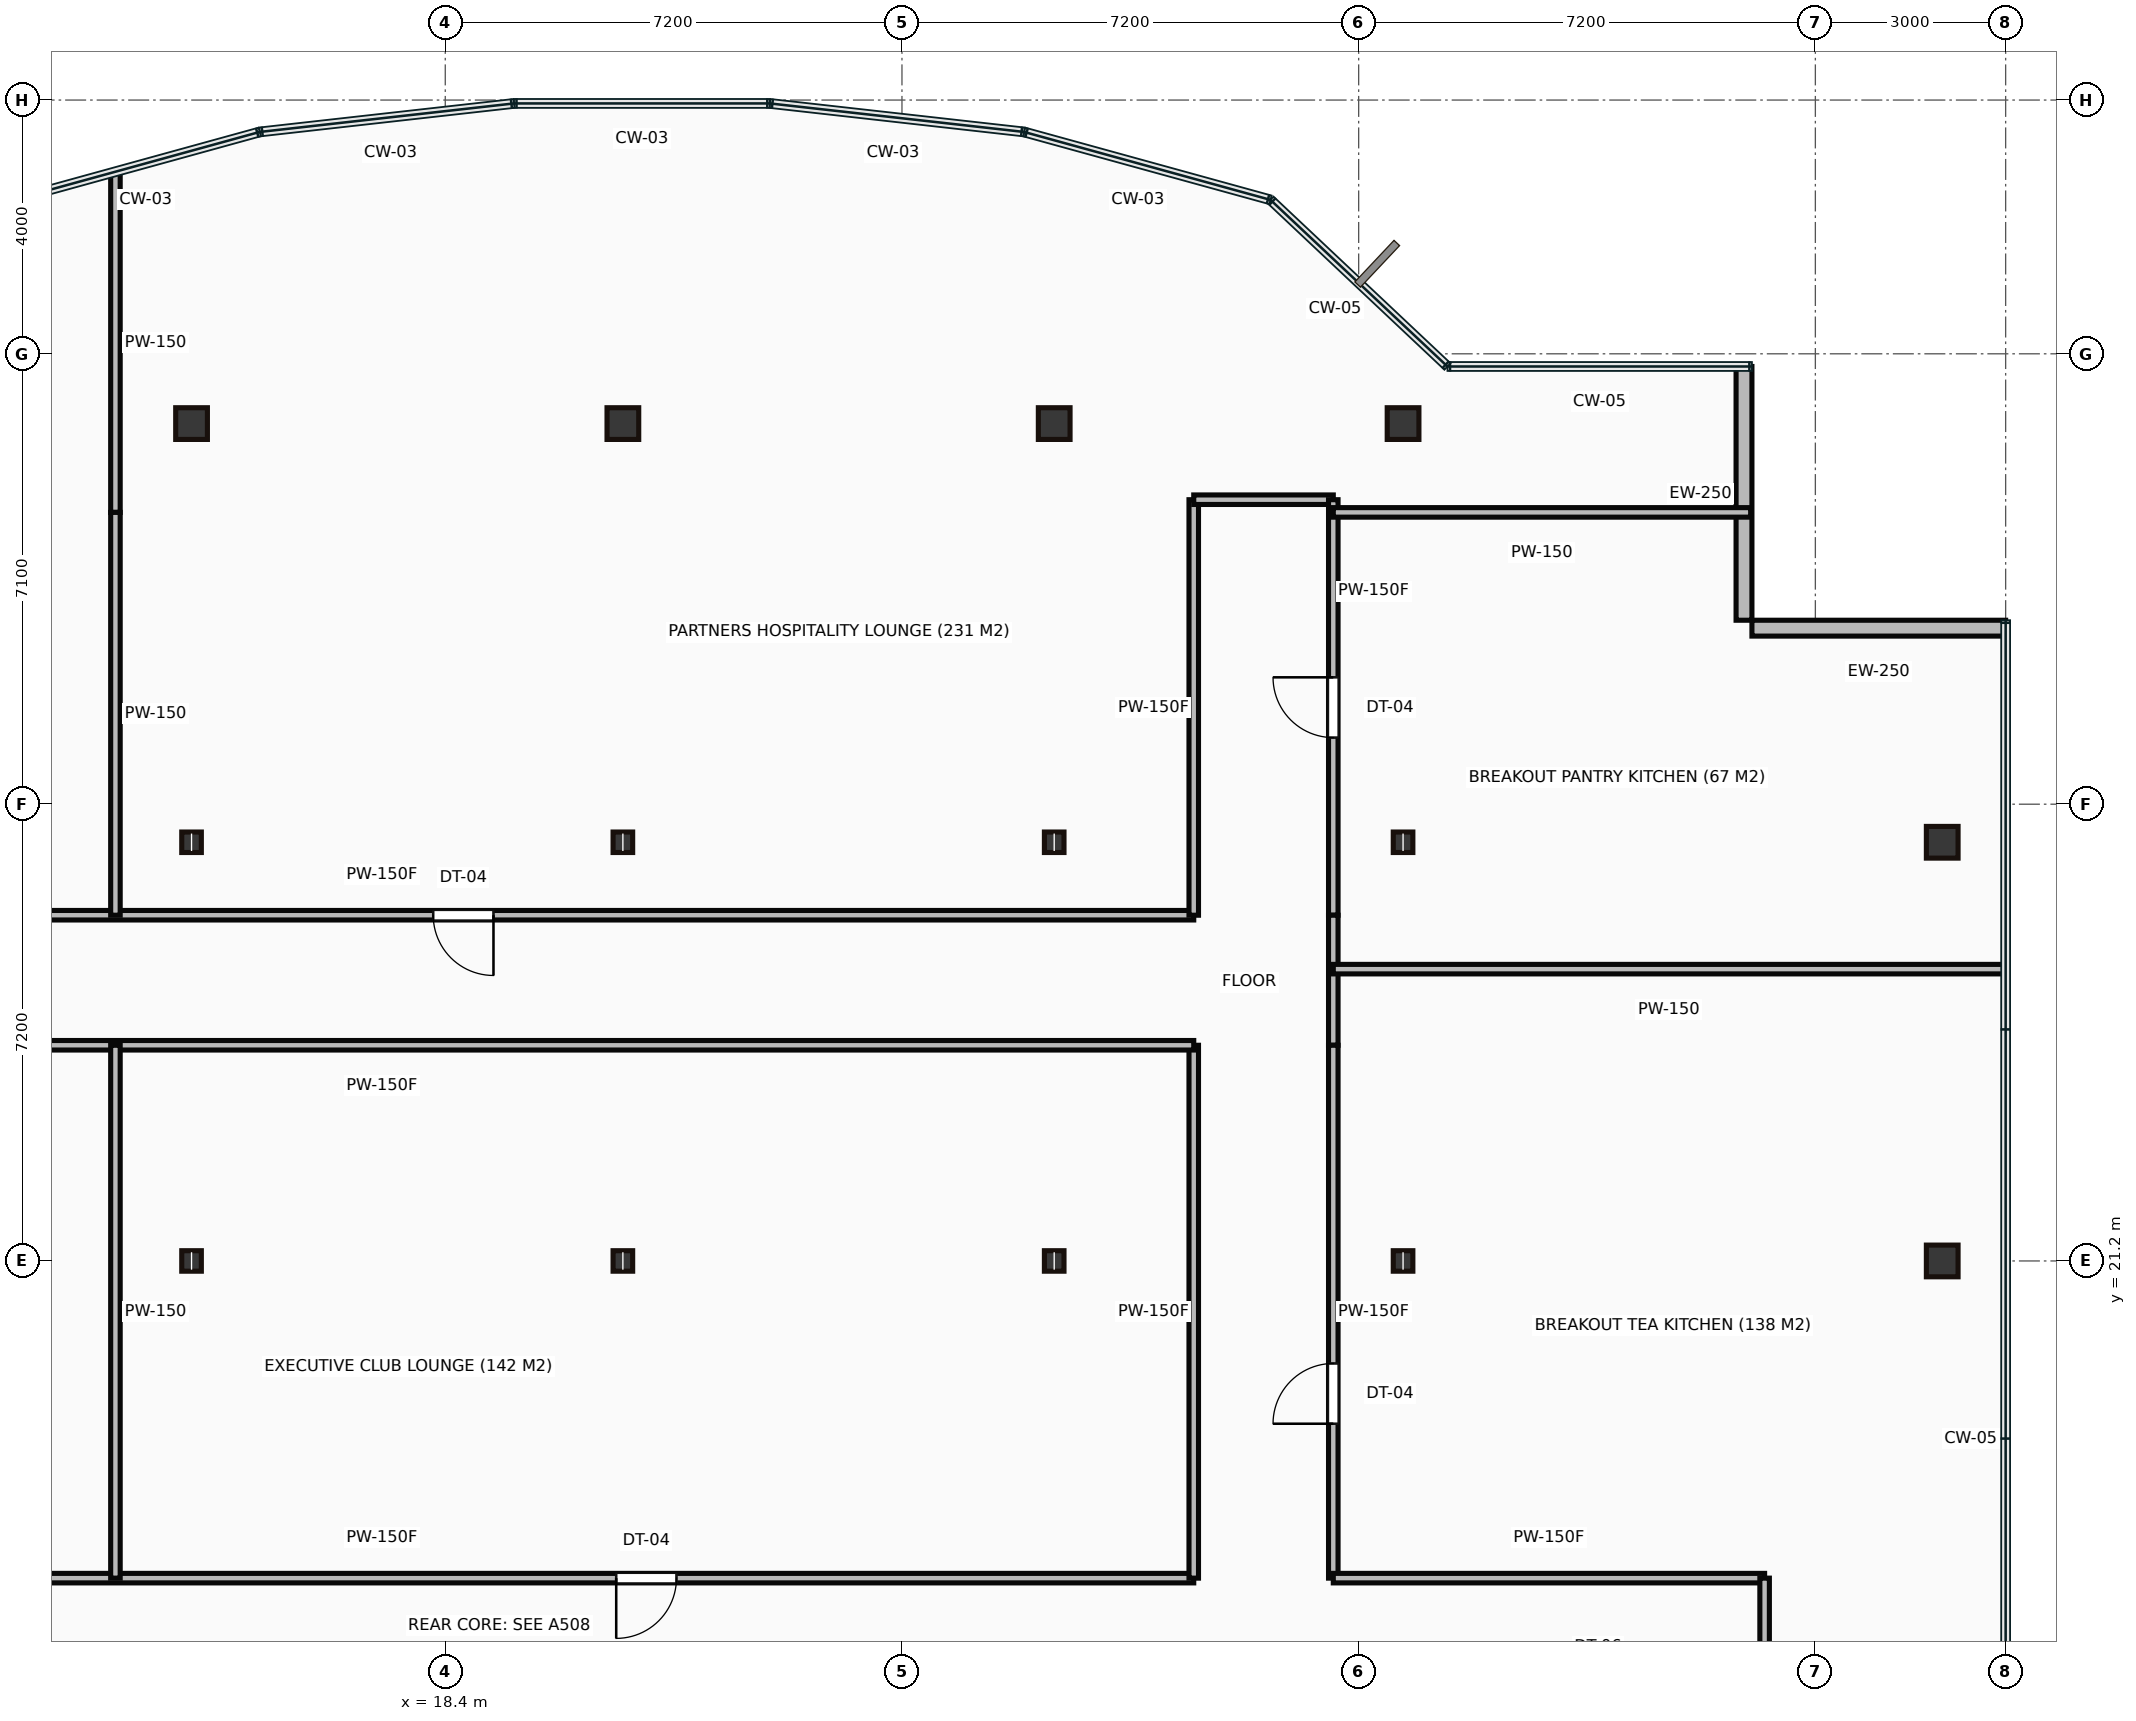
"""IFC4 building model, lengths in metres.
Left out: names, types, materials, properties, quantities, classifications, styles, units other than length and angle.
Written with IfcOpenShell. Run it as: python <this file> out.ifc"""

import sys

from ifc_helpers import new_model, si_unit, direction, frame, frame_2d, origin, origin_2d, place, context, subcontext, project, spatial, rectangle, hollow_rectangle, i_section, extrude, source, transform, mapped, element, fill, save


model = new_model("IFC4")
c1 = context("Model", 3, precision=1e-05, world=origin(), true_north=direction((0.0, 1.0)))
c2 = subcontext(c1, "Body", "Model", "MODEL_VIEW")
j1 = project(units=[si_unit("LENGTHUNIT", "METRE"), si_unit("PLANEANGLEUNIT", "RADIAN")], contexts=[c1])
p1 = place(None, origin())
s1 = spatial("IfcSite", under=j1, at=p1, CompositionType="ELEMENT")
p2 = place(p1, origin())
s2 = spatial("IfcBuilding", under=s1, at=p2, CompositionType="ELEMENT")
p3 = place(p2, frame((0.0, 0.0, 199.55)))
s3 = spatial("IfcBuildingStorey", under=s2, at=p3, CompositionType="ELEMENT", Elevation=199.55)
m1 = source(origin(), c2, "Body", "SweptSolid", [
    extrude(i_section(OverallWidth=0.309, OverallDepth=0.323, WebThickness=0.014, FlangeThickness=0.023, at=origin_2d()), origin(), (0.0, 0.0, 1.0), 3.65),
])
for number, where, z_axis, x_axis in (
    (1, (14.4, 21.2, 0.0), (0.0, 0.0, 1.0), (1.0, 0.0, 0.0)),
    (2, (14.4, 27.8, 0.0), (0.0, 0.0, 1.0), (1.0, 0.0, 0.0)),
):
    element("IfcColumn", number, at=place(p3, frame(where, z_axis=z_axis, x_axis=x_axis)), inside=s3, PredefinedType="COLUMN", context=c2, shape_type="MappedRepresentation", body=[
        mapped(m1, transform((0.0, 0.0, 0.0))),
    ])
m2 = source(origin(), c2, "Body", "SweptSolid", [
    extrude(hollow_rectangle(XDim=0.5, YDim=0.5, WallThickness=0.022, at=origin_2d()), origin(), (0.0, 0.0, 1.0), 3.65),
])
p4 = place(p3, frame((14.4, 34.4, 0.0), z_axis=(0.0, 0.0, 1.0), x_axis=(1.0, 0.0, 0.0)))
e3 = element("IfcColumn", 3, at=p4, inside=s3, PredefinedType="COLUMN", context=c2, shape_type="MappedRepresentation", body=[
    mapped(m2, transform((0.0, 0.0, 0.0))),
])
for number, where, z_axis, x_axis in (
    (4, (21.2, 21.2, 0.0), (0.0, 0.0, 1.0), (1.0, 0.0, 0.0)),
    (5, (21.2, 27.8, 0.0), (0.0, 0.0, 1.0), (1.0, 0.0, 0.0)),
):
    element("IfcColumn", number, at=place(p3, frame(where, z_axis=z_axis, x_axis=x_axis)), inside=s3, PredefinedType="COLUMN", context=c2, shape_type="MappedRepresentation", body=[
        mapped(m1, transform((0.0, 0.0, 0.0))),
    ])
p5 = place(p3, frame((21.2, 34.4, 0.0), z_axis=(0.0, 0.0, 1.0), x_axis=(1.0, 0.0, 0.0)))
e6 = element("IfcColumn", 6, at=p5, inside=s3, PredefinedType="COLUMN", context=c2, shape_type="MappedRepresentation", body=[
    mapped(m2, transform((0.0, 0.0, 0.0))),
])
for number, where, z_axis, x_axis in (
    (7, (28.0, 21.2, 0.0), (0.0, 0.0, 1.0), (1.0, 0.0, 0.0)),
    (8, (28.0, 27.8, 0.0), (0.0, 0.0, 1.0), (1.0, 0.0, 0.0)),
):
    element("IfcColumn", number, at=place(p3, frame(where, z_axis=z_axis, x_axis=x_axis)), inside=s3, PredefinedType="COLUMN", context=c2, shape_type="MappedRepresentation", body=[
        mapped(m1, transform((0.0, 0.0, 0.0))),
    ])
p6 = place(p3, frame((28.0, 34.4, 0.0), z_axis=(0.0, 0.0, 1.0), x_axis=(1.0, 0.0, 0.0)))
e9 = element("IfcColumn", 9, at=p6, inside=s3, PredefinedType="COLUMN", context=c2, shape_type="MappedRepresentation", body=[
    mapped(m2, transform((0.0, 0.0, 0.0))),
])
for number, where, z_axis, x_axis in (
    (10, (33.5, 21.2, 0.0), (0.0, 0.0, 1.0), (1.0, 0.0, 0.0)),
    (11, (33.5, 27.8, 0.0), (0.0, 0.0, 1.0), (1.0, 0.0, 0.0)),
):
    element("IfcColumn", number, at=place(p3, frame(where, z_axis=z_axis, x_axis=x_axis)), inside=s3, PredefinedType="COLUMN", context=c2, shape_type="MappedRepresentation", body=[
        mapped(m1, transform((0.0, 0.0, 0.0))),
    ])
for number, where, z_axis, x_axis in (
    (12, (33.5, 34.4, 0.0), (0.0, 0.0, 1.0), (1.0, 0.0, 0.0)),
    (13, (42.0, 21.2, 0.0), (0.0, 0.0, 1.0), (1.0, 0.0, 0.0)),
    (14, (42.0, 27.8, 0.0), (0.0, 0.0, 1.0), (1.0, 0.0, 0.0)),
):
    element("IfcColumn", number, at=place(p3, frame(where, z_axis=z_axis, x_axis=x_axis)), inside=s3, PredefinedType="COLUMN", context=c2, shape_type="MappedRepresentation", body=[
        mapped(m2, transform((0.0, 0.0, 0.0))),
    ])
m3 = source(origin(), c2, "Body", "SweptSolid", [
    extrude(rectangle(XDim=4.0, YDim=0.25, at=frame_2d((2.0, 0.0))), origin(), (0.0, 0.0, 1.0), 3.4),
])
for number, where, z_axis, x_axis in (
    (15, (43.0, 31.175, 0.0), (0.0, 0.0, 1.0), (-1.0, 0.0, 0.0)),
    (16, (38.875, 31.3, 0.0), (0.0, 0.0, 1.0), (0.0, 1.0, 0.0)),
):
    element("IfcWall", number, at=place(p3, frame(where, z_axis=z_axis, x_axis=x_axis)), inside=s3, PredefinedType="STANDARD", context=c2, shape_type="MappedRepresentation", body=[
        mapped(m3, transform((0.0, 0.0, 0.0))),
    ])
m4 = source(origin(), c2, "Body", "SweptSolid", [
    extrude(rectangle(XDim=25.6, YDim=0.15, at=frame_2d((12.8, 0.0))), origin(), (0.0, 0.0, 1.0), 3.4),
])
p7 = place(p3, frame((4.6, 16.2, 0.0), z_axis=(0.0, 0.0, 1.0), x_axis=(1.0, 0.0, 0.0)))
e17 = element("IfcWall", 17, at=p7, inside=s3, PredefinedType="PARTITIONING", context=c2, shape_type="MappedRepresentation", body=[
    mapped(m4, transform((0.0, 0.0, 0.0))),
])
p8 = place(p7, frame((3.955, 0.0, 0.0)))
e18 = element("IfcOpeningElement", 18, at=p8, cuts=e17, PredefinedType="OPENING", context=c2, shape_type="SweptSolid", body=[
    extrude(rectangle(XDim=0.95, YDim=2.15, at=frame_2d((0.475, 1.075))), frame((0.0, 0.085, 0.0), z_axis=(0.0, -1.0, 0.0), x_axis=(1.0, 0.0, 0.0)), (0.0, 0.0, 1.0), 0.17),
])
p9 = place(p7, frame((16.495, 0.0, 0.0)))
e19 = element("IfcOpeningElement", 19, at=p9, cuts=e17, PredefinedType="OPENING", context=c2, shape_type="SweptSolid", body=[
    extrude(rectangle(XDim=0.95, YDim=2.15, at=frame_2d((0.475, 1.075))), frame((0.0, 0.085, 0.0), z_axis=(0.0, -1.0, 0.0), x_axis=(1.0, 0.0, 0.0)), (0.0, 0.0, 1.0), 0.17),
])
m5 = source(origin(), c2, "Body", "SweptSolid", [
    extrude(rectangle(XDim=8.4, YDim=0.15, at=frame_2d((4.2, 0.0))), origin(), (0.0, 0.0, 1.0), 3.4),
])
p10 = place(p3, frame((30.2, 16.2, 0.0), z_axis=(0.0, 0.0, 1.0), x_axis=(0.0, 1.0, 0.0)))
e20 = element("IfcWall", 20, at=p10, inside=s3, PredefinedType="PARTITIONING", context=c2, shape_type="MappedRepresentation", body=[
    mapped(m5, transform((0.0, 0.0, 0.0))),
])
p11 = place(p3, frame((30.2, 24.6, 0.0), z_axis=(0.0, 0.0, 1.0), x_axis=(-1.0, 0.0, 0.0)))
e21 = element("IfcWall", 21, at=p11, inside=s3, PredefinedType="PARTITIONING", context=c2, shape_type="MappedRepresentation", body=[
    mapped(m4, transform((0.0, 0.0, 0.0))),
])
p12 = place(p3, frame((4.6, 26.65, 0.0), z_axis=(0.0, 0.0, 1.0), x_axis=(1.0, 0.0, 0.0)))
e22 = element("IfcWall", 22, at=p12, inside=s3, PredefinedType="PARTITIONING", context=c2, shape_type="MappedRepresentation", body=[
    mapped(m4, transform((0.0, 0.0, 0.0))),
])
p13 = place(p12, frame((3.955, 0.0, 0.0)))
e23 = element("IfcOpeningElement", 23, at=p13, cuts=e22, PredefinedType="OPENING", context=c2, shape_type="SweptSolid", body=[
    extrude(rectangle(XDim=0.95, YDim=2.15, at=frame_2d((0.475, 1.075))), frame((0.0, 0.085, 0.0), z_axis=(0.0, -1.0, 0.0), x_axis=(1.0, 0.0, 0.0)), (0.0, 0.0, 1.0), 0.17),
])
p14 = place(p12, frame((13.61, 0.0, 0.0)))
e24 = element("IfcOpeningElement", 24, at=p14, cuts=e22, PredefinedType="OPENING", context=c2, shape_type="SweptSolid", body=[
    extrude(rectangle(XDim=0.95, YDim=2.15, at=frame_2d((0.475, 1.075))), frame((0.0, 0.085, 0.0), z_axis=(0.0, -1.0, 0.0), x_axis=(1.0, 0.0, 0.0)), (0.0, 0.0, 1.0), 0.17),
])
m6 = source(origin(), c2, "Body", "SweptSolid", [
    extrude(rectangle(XDim=6.55, YDim=0.15, at=frame_2d((3.275, 0.0))), origin(), (0.0, 0.0, 1.0), 3.4),
])
p15 = place(p3, frame((30.2, 26.65, 0.0), z_axis=(0.0, 0.0, 1.0), x_axis=(0.0, 1.0, 0.0)))
e25 = element("IfcWall", 25, at=p15, inside=s3, PredefinedType="PARTITIONING", context=c2, shape_type="MappedRepresentation", body=[
    mapped(m6, transform((0.0, 0.0, 0.0))),
])
m7 = source(origin(), c2, "Body", "SweptSolid", [
    extrude(rectangle(XDim=2.2, YDim=0.15, at=frame_2d((1.1, 0.0))), origin(), (0.0, 0.0, 1.0), 3.4),
])
p16 = place(p3, frame((30.2, 33.2, 0.0), z_axis=(0.0, 0.0, 1.0), x_axis=(1.0, 0.0, 0.0)))
e26 = element("IfcWall", 26, at=p16, inside=s3, PredefinedType="PARTITIONING", context=c2, shape_type="MappedRepresentation", body=[
    mapped(m7, transform((0.0, 0.0, 0.0))),
])
p17 = place(p3, frame((32.4, 33.2, 0.0), z_axis=(0.0, 0.0, 1.0), x_axis=(0.0, -1.0, 0.0)))
e27 = element("IfcWall", 27, at=p17, inside=s3, PredefinedType="PARTITIONING", context=c2, shape_type="MappedRepresentation", body=[
    mapped(m6, transform((0.0, 0.0, 0.0))),
])
p18 = place(p17, frame((2.8, 0.0, 0.0)))
e28 = element("IfcOpeningElement", 28, at=p18, cuts=e27, PredefinedType="OPENING", context=c2, shape_type="SweptSolid", body=[
    extrude(rectangle(XDim=0.95, YDim=2.15, at=frame_2d((0.475, 1.075))), frame((0.0, 0.085, 0.0), z_axis=(0.0, -1.0, 0.0), x_axis=(1.0, 0.0, 0.0)), (0.0, 0.0, 1.0), 0.17),
])
m8 = source(origin(), c2, "Body", "SweptSolid", [
    extrude(rectangle(XDim=2.05, YDim=0.15, at=frame_2d((1.025, 0.0))), origin(), (0.0, 0.0, 1.0), 3.4),
])
p19 = place(p3, frame((32.4, 26.65, 0.0), z_axis=(0.0, 0.0, 1.0), x_axis=(0.0, -1.0, 0.0)))
e29 = element("IfcWall", 29, at=p19, inside=s3, PredefinedType="PARTITIONING", context=c2, shape_type="MappedRepresentation", body=[
    mapped(m8, transform((0.0, 0.0, 0.0))),
])
p20 = place(p3, frame((32.4, 24.6, 0.0), z_axis=(0.0, 0.0, 1.0), x_axis=(0.0, -1.0, 0.0)))
e30 = element("IfcWall", 30, at=p20, inside=s3, PredefinedType="PARTITIONING", context=c2, shape_type="MappedRepresentation", body=[
    mapped(m5, transform((0.0, 0.0, 0.0))),
])
p21 = place(p20, frame((5.016, 0.0, 0.0)))
e31 = element("IfcOpeningElement", 31, at=p21, cuts=e30, PredefinedType="OPENING", context=c2, shape_type="SweptSolid", body=[
    extrude(rectangle(XDim=0.95, YDim=2.15, at=frame_2d((0.475, 1.075))), frame((0.0, 0.085, 0.0), z_axis=(0.0, -1.0, 0.0), x_axis=(1.0, 0.0, 0.0)), (0.0, 0.0, 1.0), 0.17),
])
m9 = source(origin(), c2, "Body", "SweptSolid", [
    extrude(rectangle(XDim=6.8, YDim=0.15, at=frame_2d((3.4, 0.0))), origin(), (0.0, 0.0, 1.0), 3.4),
])
p22 = place(p3, frame((32.4, 16.2, 0.0), z_axis=(0.0, 0.0, 1.0), x_axis=(1.0, 0.0, 0.0)))
e32 = element("IfcWall", 32, at=p22, inside=s3, PredefinedType="PARTITIONING", context=c2, shape_type="MappedRepresentation", body=[
    mapped(m9, transform((0.0, 0.0, 0.0))),
])
p23 = place(p3, frame((39.2, 16.2, 0.0), z_axis=(0.0, 0.0, 1.0), x_axis=(0.0, -1.0, 0.0)))
e33 = element("IfcWall", 33, at=p23, inside=s3, PredefinedType="PARTITIONING", context=c2, shape_type="MappedRepresentation", body=[
    mapped(m7, transform((0.0, 0.0, 0.0))),
])
p24 = place(p3, frame((13.2, 24.6, 0.0), z_axis=(0.0, 0.0, 1.0), x_axis=(0.0, -1.0, 0.0)))
e34 = element("IfcWall", 34, at=p24, inside=s3, PredefinedType="PARTITIONING", context=c2, shape_type="MappedRepresentation", body=[
    mapped(m5, transform((0.0, 0.0, 0.0))),
])
m10 = source(origin(), c2, "Body", "SweptSolid", [
    extrude(rectangle(XDim=5.35, YDim=0.15, at=frame_2d((2.675, 0.0))), origin(), (0.0, 0.0, 1.0), 3.4),
])
p25 = place(p3, frame((13.2, 38.35, 0.0), z_axis=(0.0, 0.0, 1.0), x_axis=(0.0, -1.0, 0.0)))
e35 = element("IfcWall", 35, at=p25, inside=s3, PredefinedType="PARTITIONING", context=c2, shape_type="MappedRepresentation", body=[
    mapped(m10, transform((0.0, 0.0, 0.0))),
])
m11 = source(origin(), c2, "Body", "SweptSolid", [
    extrude(rectangle(XDim=6.35, YDim=0.15, at=frame_2d((3.175, 0.0))), origin(), (0.0, 0.0, 1.0), 3.4),
])
p26 = place(p3, frame((13.2, 33.0, 0.0), z_axis=(0.0, 0.0, 1.0), x_axis=(0.0, -1.0, 0.0)))
e36 = element("IfcWall", 36, at=p26, inside=s3, PredefinedType="PARTITIONING", context=c2, shape_type="MappedRepresentation", body=[
    mapped(m11, transform((0.0, 0.0, 0.0))),
])
m12 = source(origin(), c2, "Body", "SweptSolid", [
    extrude(rectangle(XDim=10.58, YDim=0.15, at=frame_2d((5.29, 0.0))), origin(), (0.0, 0.0, 1.0), 3.4),
])
p27 = place(p3, frame((42.98, 25.8, 0.0), z_axis=(0.0, 0.0, 1.0), x_axis=(-1.0, 0.0, 0.0)))
e37 = element("IfcWall", 37, at=p27, inside=s3, PredefinedType="PARTITIONING", context=c2, shape_type="MappedRepresentation", body=[
    mapped(m12, transform((0.0, 0.0, 0.0))),
])
m13 = source(origin(), c2, "Body", "SweptSolid", [
    extrude(rectangle(XDim=6.58, YDim=0.15, at=frame_2d((3.29, 0.0))), origin(), (0.0, 0.0, 1.0), 3.4),
])
p28 = place(p3, frame((38.98, 33.0, 0.0), z_axis=(0.0, 0.0, 1.0), x_axis=(-1.0, 0.0, 0.0)))
e38 = element("IfcWall", 38, at=p28, inside=s3, PredefinedType="PARTITIONING", context=c2, shape_type="MappedRepresentation", body=[
    mapped(m13, transform((0.0, 0.0, 0.0))),
])
m14 = source(origin(), c2, "Body", "SweptSolid", [
    extrude(rectangle(XDim=0.95, YDim=2.15, at=frame_2d((0.475, 1.075))), frame((0.0, 0.025, 0.0), z_axis=(0.0, -1.0, 0.0), x_axis=(1.0, 0.0, 0.0)), (0.0, 0.0, 1.0), 0.05),
])
p29 = place(p9, origin())
e39 = element("IfcDoor", 39, at=p29, inside=s3, OperationType="SINGLE_SWING_LEFT", PredefinedType="DOOR", context=c2, shape_type="MappedRepresentation", body=[
    mapped(m14, transform((0.0, 0.0, 0.0))),
])
fill(e19, e39)
p30 = place(p14, origin())
e40 = element("IfcDoor", 40, at=p30, inside=s3, OperationType="SINGLE_SWING_RIGHT", PredefinedType="DOOR", context=c2, shape_type="MappedRepresentation", body=[
    mapped(m14, transform((0.0, 0.0, 0.0))),
])
fill(e24, e40)
p31 = place(p18, origin())
e41 = element("IfcDoor", 41, at=p31, inside=s3, OperationType="SINGLE_SWING_LEFT", PredefinedType="DOOR", context=c2, shape_type="MappedRepresentation", body=[
    mapped(m14, transform((0.0, 0.0, 0.0))),
])
fill(e28, e41)
p32 = place(p21, origin())
e42 = element("IfcDoor", 42, at=p32, inside=s3, OperationType="SINGLE_SWING_RIGHT", PredefinedType="DOOR", context=c2, shape_type="MappedRepresentation", body=[
    mapped(m14, transform((0.0, 0.0, 0.0))),
])
fill(e31, e42)
save(model, sys.argv[1])
